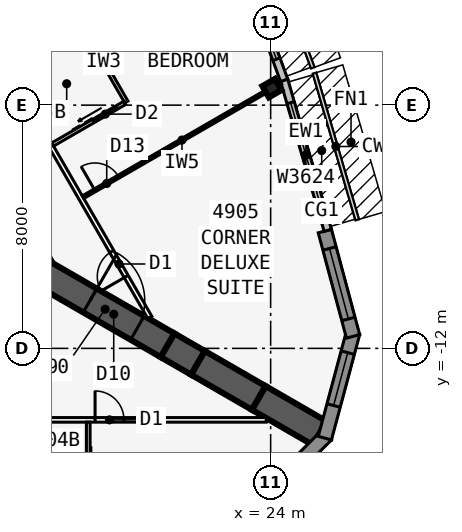
"""IFC4 building model, lengths in metres.
Left out: names, types, materials, properties, quantities, classifications, styles, units other than length and angle.
Written with IfcOpenShell. Run it as: python <this file> out.ifc"""

import sys

from ifc_helpers import new_model, si_unit, direction, frame, frame_2d, origin, origin_2d, place, context, subcontext, project, spatial, polyline, rectangle, i_section, outline, extrude, element, fill, save


model = new_model("IFC4")
c1 = context("Model", 3, precision=1e-05, world=origin(), true_north=direction((0.0, 1.0)))
c2 = subcontext(c1, "Body", "Model", "MODEL_VIEW")
j1 = project(units=[si_unit("LENGTHUNIT", "METRE"), si_unit("PLANEANGLEUNIT", "RADIAN")], contexts=[c1])
p1 = place(None, origin())
s1 = spatial("IfcSite", under=j1, at=p1, CompositionType="ELEMENT")
p2 = place(p1, origin())
s2 = spatial("IfcBuilding", under=s1, at=p2, CompositionType="ELEMENT")
p3 = place(p2, frame((0.0, 0.0, 182.7)))
s3 = spatial("IfcBuildingStorey", under=s2, at=p3, CompositionType="ELEMENT", Elevation=182.7)
p4 = place(p3, frame((16.5, -9.526, 0.0), z_axis=(0.0, 0.0, 1.0), x_axis=(-0.499999749417, 0.866025548458, 0.0)))
e1 = element("IfcWall", 1, at=p4, inside=s3, PredefinedType="SHEAR", context=c2, shape_type="SweptSolid", body=[
    extrude(rectangle(XDim=33.0, YDim=0.9, at=frame_2d((16.5, 0.0))), origin(), (0.0, 0.0, 1.0), 3.4),
])
p5 = place(p4, frame((14.15, 0.0, 0.0)))
e2 = element("IfcOpeningElement", 2, at=p5, cuts=e1, PredefinedType="OPENING", context=c2, shape_type="SweptSolid", body=[
    extrude(rectangle(XDim=1.8, YDim=2.13, at=frame_2d((0.9, 1.065))), frame((0.0, 0.46, 0.0), z_axis=(0.0, -1.0, 0.0), x_axis=(1.0, 0.0, 0.0)), (0.0, 0.0, 1.0), 0.92),
])
p6 = place(p4, frame((12.6, 0.0, 0.0)))
e3 = element("IfcOpeningElement", 3, at=p6, cuts=e1, PredefinedType="OPENING", context=c2, shape_type="SweptSolid", body=[
    extrude(rectangle(XDim=1.0, YDim=2.13, at=frame_2d((0.5, 1.065))), frame((0.0, 0.46, 0.0), z_axis=(0.0, -1.0, 0.0), x_axis=(1.0, 0.0, 0.0)), (0.0, 0.0, 1.0), 0.92),
])
p7 = place(p3, frame((16.5, -9.526, 0.0), z_axis=(0.0, 0.0, 1.0), x_axis=(0.866031398331, -0.499989616998, 0.0)))
e4 = element("IfcWall", 4, at=p7, inside=s3, PredefinedType="SHEAR", context=c2, shape_type="SweptSolid", body=[
    extrude(rectangle(XDim=4.746, YDim=0.9, at=frame_2d((2.373, 0.0))), origin(), (0.0, 0.0, 1.0), 3.4),
])
p8 = place(p7, frame((1.8, 0.0, 0.0)))
e5 = element("IfcOpeningElement", 5, at=p8, cuts=e4, PredefinedType="OPENING", context=c2, shape_type="SweptSolid", body=[
    extrude(rectangle(XDim=1.8, YDim=2.13, at=frame_2d((0.9, 1.065))), frame((0.0, 0.46, 0.0), z_axis=(0.0, -1.0, 0.0), x_axis=(1.0, 0.0, 0.0)), (0.0, 0.0, 1.0), 0.92),
])
p9 = place(p3, frame((20.61, -11.899, 0.0), z_axis=(0.0, 0.0, 1.0), x_axis=(0.866009537788, -0.500027479704, 0.0)))
e6 = element("IfcWall", 6, at=p9, inside=s3, PredefinedType="SHEAR", context=c2, shape_type="SweptSolid", body=[
    extrude(rectangle(XDim=1.155, YDim=0.9, at=frame_2d((0.577, 0.0))), origin(), (0.0, 0.0, 1.0), 3.4),
])
for number, where, z_axis, x_axis in (
    (7, (21.61, -12.477, 0.0), (0.0, 0.0, 1.0), (0.866, -0.5, 0.0)),
    (8, (23.61, -13.631, 0.0), (0.0, 0.0, 1.0), (0.866, -0.5, 0.0)),
):
    element("IfcWall", number, at=place(p3, frame(where, z_axis=z_axis, x_axis=x_axis)), inside=s3, PredefinedType="SHEAR", context=c2, shape_type="SweptSolid", body=[
        extrude(rectangle(XDim=2.309, YDim=0.9, at=frame_2d((1.155, 0.0))), origin(), (0.0, 0.0, 1.0), 3.4),
    ])
p10 = place(p3, frame((24.041, -3.44, 0.0), z_axis=(0.0, 0.0, 1.0), x_axis=(-0.5, 0.866025403784, 0.0)))
e9 = element("IfcColumn", 9, at=p10, inside=s3, PredefinedType="COLUMN", context=c2, shape_type="SweptSolid", body=[
    extrude(i_section(OverallWidth=0.424, OverallDepth=0.475, WebThickness=0.048, FlangeThickness=0.077, at=origin_2d()), origin(), (0.0, 0.0, 1.0), 3.4),
])
p11 = place(p3, frame((23.305, -17.388, 0.0), z_axis=(0.0, 0.0, 1.0), x_axis=(0.707106781187, 0.707106781187, 0.0)))
e10 = element("IfcWall", 10, at=p11, inside=s3, PredefinedType="SOLIDWALL", context=c2, shape_type="SweptSolid", body=[
    extrude(outline(polyline([(3.586, 0.225), (3.527, 0.225), (3.035, 0.093), (3.0, 0.225), (0.0, 0.225), (0.0, -0.225), (3.586, -0.225), (3.586, 0.225)])), origin(), (0.0, 0.0, 1.0), 3.235),
])
p12 = place(p11, frame((0.675, 0.0, 0.45)))
e11 = element("IfcOpeningElement", 11, at=p12, cuts=e10, PredefinedType="OPENING", context=c2, shape_type="SweptSolid", body=[
    extrude(rectangle(XDim=1.8, YDim=2.4, at=frame_2d((0.9, 1.2))), frame((0.0, 0.235, 0.0), z_axis=(0.0, -1.0, 0.0), x_axis=(1.0, 0.0, 0.0)), (0.0, 0.0, 1.0), 0.47),
])
p13 = place(p3, frame((25.783, -14.953, 0.0), z_axis=(0.0, 0.0, 1.0), x_axis=(0.258823421857, 0.965924653531, 0.0)))
e12 = element("IfcWall", 12, at=p13, inside=s3, PredefinedType="SOLIDWALL", context=c2, shape_type="SweptSolid", body=[
    extrude(outline(polyline([(3.586, 0.225), (0.586, 0.225), (0.551, 0.093), (0.06, 0.225), (0.0, 0.225), (0.0, -0.225), (3.586, -0.225), (3.586, 0.225)])), origin(), (0.0, 0.0, 1.0), 3.235),
])
p14 = place(p13, frame((1.111, 0.0, 0.45)))
e13 = element("IfcOpeningElement", 13, at=p14, cuts=e12, PredefinedType="OPENING", context=c2, shape_type="SweptSolid", body=[
    extrude(rectangle(XDim=1.8, YDim=2.4, at=frame_2d((0.9, 1.2))), frame((0.0, 0.235, 0.0), z_axis=(0.0, -1.0, 0.0), x_axis=(1.0, 0.0, 0.0)), (0.0, 0.0, 1.0), 0.47),
])
p15 = place(p3, frame((26.711, -11.605, 0.0), z_axis=(0.0, 0.0, 1.0), x_axis=(-0.258823421857, 0.965924653531, 0.0)))
e14 = element("IfcWall", 14, at=p15, inside=s3, PredefinedType="SOLIDWALL", context=c2, shape_type="SweptSolid", body=[
    extrude(rectangle(XDim=3.586, YDim=0.45, at=frame_2d((1.793, 0.0))), origin(), (0.0, 0.0, 1.0), 3.235),
])
p16 = place(p15, frame((0.593, 0.0, 0.45)))
e15 = element("IfcOpeningElement", 15, at=p16, cuts=e14, PredefinedType="OPENING", context=c2, shape_type="SweptSolid", body=[
    extrude(rectangle(XDim=2.4, YDim=2.4, at=frame_2d((1.2, 1.2))), frame((0.0, 0.235, 0.0), z_axis=(0.0, -1.0, 0.0), x_axis=(1.0, 0.0, 0.0)), (0.0, 0.0, 1.0), 0.47),
])
p17 = place(p3, frame((25.88, -8.118, 0.0), z_axis=(0.0, 0.0, 1.0), x_axis=(-0.279528287117, 0.960137457191, 0.0)))
e16 = element("IfcWall", 16, at=p17, inside=s3, PredefinedType="STANDARD", context=c2, shape_type="SweptSolid", body=[
    extrude(rectangle(XDim=5.148, YDim=0.25, at=frame_2d((2.574, 0.0))), origin(), (0.0, 0.0, 1.0), 3.235),
])
p18 = place(p17, frame((0.774, 0.0, 0.45)))
e17 = element("IfcOpeningElement", 17, at=p18, cuts=e16, PredefinedType="OPENING", context=c2, shape_type="SweptSolid", body=[
    extrude(rectangle(XDim=3.6, YDim=2.4, at=frame_2d((1.8, 1.2))), frame((0.0, 0.135, 0.0), z_axis=(0.0, -1.0, 0.0), x_axis=(1.0, 0.0, 0.0)), (0.0, 0.0, 1.0), 0.27),
])
p19 = place(p3, frame((24.444, -3.183, 0.0), z_axis=(0.0, 0.0, 1.0), x_axis=(-0.343225593282, 0.939252996863, 0.0)))
e18 = element("IfcWall", 18, at=p19, inside=s3, PredefinedType="STANDARD", context=c2, shape_type="SweptSolid", body=[
    extrude(rectangle(XDim=5.076, YDim=0.25, at=frame_2d((2.538, 0.0))), origin(), (0.0, 0.0, 1.0), 3.235),
])
p20 = place(p19, frame((0.738, 0.0, 0.45)))
e19 = element("IfcOpeningElement", 19, at=p20, cuts=e18, PredefinedType="OPENING", context=c2, shape_type="SweptSolid", body=[
    extrude(rectangle(XDim=3.6, YDim=2.4, at=frame_2d((1.8, 1.2))), frame((0.0, 0.135, 0.0), z_axis=(0.0, -1.0, 0.0), x_axis=(1.0, 0.0, 0.0)), (0.0, 0.0, 1.0), 0.27),
])
p21 = place(p3, frame((-23.857, -14.351, 0.0), z_axis=(0.0, 0.0, 1.0), x_axis=(1.0, 0.0, 0.0)))
e20 = element("IfcWall", 20, at=p21, inside=s3, PredefinedType="PARTITIONING", context=c2, shape_type="SweptSolid", body=[
    extrude(rectangle(XDim=47.714, YDim=0.15, at=frame_2d((23.857, 0.0))), origin(), (0.0, 0.0, 1.0), 3.235),
])
p22 = place(p21, frame((3.723, 0.0, 0.0)))
e21 = element("IfcOpeningElement", 21, at=p22, cuts=e20, PredefinedType="OPENING", context=c2, shape_type="SweptSolid", body=[
    extrude(rectangle(XDim=0.95, YDim=2.13, at=frame_2d((0.475, 1.065))), frame((0.0, 0.085, 0.0), z_axis=(0.0, -1.0, 0.0), x_axis=(1.0, 0.0, 0.0)), (0.0, 0.0, 1.0), 0.17),
])
p23 = place(p21, frame((17.082, 0.0, 0.0)))
e22 = element("IfcOpeningElement", 22, at=p23, cuts=e20, PredefinedType="OPENING", context=c2, shape_type="SweptSolid", body=[
    extrude(rectangle(XDim=0.95, YDim=2.13, at=frame_2d((0.475, 1.065))), frame((0.0, 0.085, 0.0), z_axis=(0.0, -1.0, 0.0), x_axis=(1.0, 0.0, 0.0)), (0.0, 0.0, 1.0), 0.17),
])
p24 = place(p21, frame((25.857, 0.0, 0.0)))
e23 = element("IfcOpeningElement", 23, at=p24, cuts=e20, PredefinedType="OPENING", context=c2, shape_type="SweptSolid", body=[
    extrude(rectangle(XDim=1.0, YDim=2.13, at=frame_2d((0.5, 1.065))), frame((0.0, 0.085, 0.0), z_axis=(0.0, -1.0, 0.0), x_axis=(1.0, 0.0, 0.0)), (0.0, 0.0, 1.0), 0.17),
])
p25 = place(p21, frame((30.882, 0.0, 0.0)))
e24 = element("IfcOpeningElement", 24, at=p25, cuts=e20, PredefinedType="OPENING", context=c2, shape_type="SweptSolid", body=[
    extrude(rectangle(XDim=0.95, YDim=2.13, at=frame_2d((0.475, 1.065))), frame((0.0, 0.085, 0.0), z_axis=(0.0, -1.0, 0.0), x_axis=(1.0, 0.0, 0.0)), (0.0, 0.0, 1.0), 0.17),
])
p26 = place(p21, frame((42.082, 0.0, 0.0)))
e25 = element("IfcOpeningElement", 25, at=p26, cuts=e20, PredefinedType="OPENING", context=c2, shape_type="SweptSolid", body=[
    extrude(rectangle(XDim=0.95, YDim=2.13, at=frame_2d((0.475, 1.065))), frame((0.0, 0.085, 0.0), z_axis=(0.0, -1.0, 0.0), x_axis=(1.0, 0.0, 0.0)), (0.0, 0.0, 1.0), 0.17),
])
p27 = place(p3, frame((18.0, -14.426, 0.0), z_axis=(0.0, 0.0, 1.0), x_axis=(0.0, -1.0, 0.0)))
e26 = element("IfcWall", 26, at=p27, inside=s3, PredefinedType="PLUMBINGWALL", context=c2, shape_type="SweptSolid", body=[
    extrude(rectangle(XDim=2.74, YDim=0.12, at=frame_2d((1.37, 0.0))), origin(), (0.0, 0.0, 1.0), 3.235),
])
p28 = place(p27, frame((1.55, 0.0, 0.0)))
e27 = element("IfcOpeningElement", 27, at=p28, cuts=e26, PredefinedType="OPENING", context=c2, shape_type="SweptSolid", body=[
    extrude(rectangle(XDim=0.9, YDim=2.13, at=frame_2d((0.45, 1.065))), frame((0.0, 0.07, 0.0), z_axis=(0.0, -1.0, 0.0), x_axis=(1.0, 0.0, 0.0)), (0.0, 0.0, 1.0), 0.14),
])
p29 = place(p3, frame((20.027, -10.985, 0.0), z_axis=(0.0, 0.0, 1.0), x_axis=(-0.500001677587, 0.866024435227, 0.0)))
e28 = element("IfcWall", 28, at=p29, inside=s3, PredefinedType="PARTITIONING", context=c2, shape_type="SweptSolid", body=[
    extrude(rectangle(XDim=39.054, YDim=0.15, at=frame_2d((19.527, 0.0))), origin(), (0.0, 0.0, 1.0), 3.235),
])
p30 = place(p29, frame((1.558, 0.0, 0.0)))
e29 = element("IfcOpeningElement", 29, at=p30, cuts=e28, PredefinedType="OPENING", context=c2, shape_type="SweptSolid", body=[
    extrude(rectangle(XDim=0.95, YDim=2.13, at=frame_2d((0.475, 1.065))), frame((0.0, 0.085, 0.0), z_axis=(0.0, -1.0, 0.0), x_axis=(1.0, 0.0, 0.0)), (0.0, 0.0, 1.0), 0.17),
])
p31 = place(p29, frame((12.752, 0.0, 0.0)))
e30 = element("IfcOpeningElement", 30, at=p31, cuts=e28, PredefinedType="OPENING", context=c2, shape_type="SweptSolid", body=[
    extrude(rectangle(XDim=0.95, YDim=2.13, at=frame_2d((0.475, 1.065))), frame((0.0, 0.085, 0.0), z_axis=(0.0, -1.0, 0.0), x_axis=(1.0, 0.0, 0.0)), (0.0, 0.0, 1.0), 0.17),
])
p32 = place(p29, frame((26.552, 0.0, 0.0)))
e31 = element("IfcOpeningElement", 31, at=p32, cuts=e28, PredefinedType="OPENING", context=c2, shape_type="SweptSolid", body=[
    extrude(rectangle(XDim=0.95, YDim=2.13, at=frame_2d((0.475, 1.065))), frame((0.0, 0.085, 0.0), z_axis=(0.0, -1.0, 0.0), x_axis=(1.0, 0.0, 0.0)), (0.0, 0.0, 1.0), 0.17),
])
p33 = place(p29, frame((37.752, 0.0, 0.0)))
e32 = element("IfcOpeningElement", 32, at=p33, cuts=e28, PredefinedType="OPENING", context=c2, shape_type="SweptSolid", body=[
    extrude(rectangle(XDim=0.95, YDim=2.13, at=frame_2d((0.475, 1.065))), frame((0.0, 0.085, 0.0), z_axis=(0.0, -1.0, 0.0), x_axis=(1.0, 0.0, 0.0)), (0.0, 0.0, 1.0), 0.17),
])
p34 = place(p3, frame((17.829, -7.027, 0.0), z_axis=(0.0, 0.0, 1.0), x_axis=(0.866029804378, 0.499992377871, 0.0)))
e33 = element("IfcWall", 33, at=p34, inside=s3, PredefinedType="PARTITIONING", context=c2, shape_type="SweptSolid", body=[
    extrude(rectangle(XDim=7.516, YDim=0.1, at=frame_2d((3.758, 0.0))), origin(), (0.0, 0.0, 1.0), 2.389),
])
p35 = place(p34, frame((0.45, 0.0, 0.0)))
e34 = element("IfcOpeningElement", 34, at=p35, cuts=e33, PredefinedType="OPENING", context=c2, shape_type="SweptSolid", body=[
    extrude(rectangle(XDim=0.9, YDim=2.13, at=frame_2d((0.45, 1.065))), frame((0.0, 0.06, 0.0), z_axis=(0.0, -1.0, 0.0), x_axis=(1.0, 0.0, 0.0)), (0.0, 0.0, 1.0), 0.12),
])
p36 = place(p3, frame((15.329, -2.697, 0.0), z_axis=(0.0, 0.0, 1.0), x_axis=(0.866024316602, 0.50000188305, 0.0)))
e35 = element("IfcWall", 35, at=p36, inside=s3, PredefinedType="PARTITIONING", context=c2, shape_type="SweptSolid", body=[
    extrude(rectangle(XDim=8.395, YDim=0.15, at=frame_2d((4.198, 0.0))), origin(), (0.0, 0.0, 1.0), 2.389),
])
p37 = place(p3, frame((19.253, -3.895, 0.0), z_axis=(0.0, 0.0, 1.0), x_axis=(-0.499990139034, 0.866031096941, 0.0)))
e36 = element("IfcWall", 36, at=p37, inside=s3, PredefinedType="PLUMBINGWALL", context=c2, shape_type="SweptSolid", body=[
    extrude(rectangle(XDim=3.0, YDim=0.12, at=frame_2d((1.5, 0.0))), origin(), (0.0, 0.0, 1.0), 3.235),
])
p38 = place(p3, frame((16.829, -5.295, 0.0), z_axis=(0.0, 0.0, 1.0), x_axis=(0.866035715982, 0.499982138324, 0.0)))
e37 = element("IfcWall", 37, at=p38, inside=s3, PredefinedType="PLUMBINGWALL", context=c2, shape_type="SweptSolid", body=[
    extrude(rectangle(XDim=2.74, YDim=0.12, at=frame_2d((1.37, 0.0))), origin(), (0.0, 0.0, 1.0), 3.235),
])
p39 = place(p38, frame((1.55, 0.0, 0.0)))
e38 = element("IfcOpeningElement", 38, at=p39, cuts=e37, PredefinedType="OPENING", context=c2, shape_type="SweptSolid", body=[
    extrude(rectangle(XDim=0.9, YDim=2.13, at=frame_2d((0.45, 1.065))), frame((0.0, 0.07, 0.0), z_axis=(0.0, -1.0, 0.0), x_axis=(1.0, 0.0, 0.0)), (0.0, 0.0, 1.0), 0.14),
])
p40 = place(p14, origin())
e39 = element("IfcWindow", 39, at=p40, inside=s3, PartitioningType="SINGLE_PANEL", PredefinedType="WINDOW", context=c2, shape_type="SweptSolid", body=[
    extrude(rectangle(XDim=1.8, YDim=2.4, at=frame_2d((0.9, 1.2))), frame((0.0, 0.03, 0.0), z_axis=(0.0, -1.0, 0.0), x_axis=(1.0, 0.0, 0.0)), (0.0, 0.0, 1.0), 0.06),
])
fill(e13, e39)
p41 = place(p16, origin())
e40 = element("IfcWindow", 40, at=p41, inside=s3, PartitioningType="SINGLE_PANEL", PredefinedType="WINDOW", context=c2, shape_type="SweptSolid", body=[
    extrude(rectangle(XDim=2.4, YDim=2.4, at=frame_2d((1.2, 1.2))), frame((0.0, 0.03, 0.0), z_axis=(0.0, -1.0, 0.0), x_axis=(1.0, 0.0, 0.0)), (0.0, 0.0, 1.0), 0.06),
])
fill(e15, e40)
p42 = place(p18, origin())
e41 = element("IfcWindow", 41, at=p42, inside=s3, PartitioningType="SINGLE_PANEL", PredefinedType="WINDOW", context=c2, shape_type="SweptSolid", body=[
    extrude(rectangle(XDim=3.6, YDim=2.4, at=frame_2d((1.8, 1.2))), frame((0.0, 0.03, 0.0), z_axis=(0.0, -1.0, 0.0), x_axis=(1.0, 0.0, 0.0)), (0.0, 0.0, 1.0), 0.06),
])
fill(e17, e41)
p43 = place(p20, origin())
e42 = element("IfcWindow", 42, at=p43, inside=s3, PartitioningType="SINGLE_PANEL", PredefinedType="WINDOW", context=c2, shape_type="SweptSolid", body=[
    extrude(rectangle(XDim=3.6, YDim=2.4, at=frame_2d((1.8, 1.2))), frame((0.0, 0.03, 0.0), z_axis=(0.0, -1.0, 0.0), x_axis=(1.0, 0.0, 0.0)), (0.0, 0.0, 1.0), 0.06),
])
fill(e19, e42)
p44 = place(p26, origin())
e43 = element("IfcDoor", 43, at=p44, inside=s3, OperationType="SINGLE_SWING_LEFT", PredefinedType="DOOR", context=c2, shape_type="SweptSolid", body=[
    extrude(rectangle(XDim=0.95, YDim=2.13, at=frame_2d((0.475, 1.065))), frame((0.0, 0.025, 0.0), z_axis=(0.0, -1.0, 0.0), x_axis=(1.0, 0.0, 0.0)), (0.0, 0.0, 1.0), 0.05),
])
fill(e25, e43)
p45 = place(p35, origin())
e44 = element("IfcDoor", 44, at=p45, inside=s3, OperationType="SINGLE_SWING_LEFT", PredefinedType="DOOR", context=c2, shape_type="SweptSolid", body=[
    extrude(rectangle(XDim=0.9, YDim=2.13, at=frame_2d((0.45, 1.065))), frame((0.0, 0.025, 0.0), z_axis=(0.0, -1.0, 0.0), x_axis=(1.0, 0.0, 0.0)), (0.0, 0.0, 1.0), 0.05),
])
fill(e34, e44)
p46 = place(p30, origin())
e45 = element("IfcDoor", 45, at=p46, inside=s3, OperationType="SINGLE_SWING_LEFT", PredefinedType="DOOR", context=c2, shape_type="SweptSolid", body=[
    extrude(rectangle(XDim=0.95, YDim=2.13, at=frame_2d((0.475, 1.065))), frame((0.0, 0.025, 0.0), z_axis=(0.0, -1.0, 0.0), x_axis=(1.0, 0.0, 0.0)), (0.0, 0.0, 1.0), 0.05),
])
fill(e29, e45)
p47 = place(p39, origin())
e46 = element("IfcDoor", 46, at=p47, inside=s3, OperationType="SLIDING_TO_LEFT", PredefinedType="DOOR", context=c2, shape_type="SweptSolid", body=[
    extrude(rectangle(XDim=0.9, YDim=2.13, at=frame_2d((0.45, 1.065))), frame((0.0, 0.025, 0.0), z_axis=(0.0, -1.0, 0.0), x_axis=(1.0, 0.0, 0.0)), (0.0, 0.0, 1.0), 0.05),
])
fill(e38, e46)
p48 = place(p8, origin())
e47 = element("IfcDoor", 47, at=p48, inside=s3, OperationType="DOUBLE_DOOR_DOUBLE_SWING", PredefinedType="DOOR", context=c2, shape_type="SweptSolid", body=[
    extrude(rectangle(XDim=1.8, YDim=2.13, at=frame_2d((0.9, 1.065))), frame((0.0, 0.025, 0.0), z_axis=(0.0, -1.0, 0.0), x_axis=(1.0, 0.0, 0.0)), (0.0, 0.0, 1.0), 0.05),
])
fill(e5, e47)
save(model, sys.argv[1])
